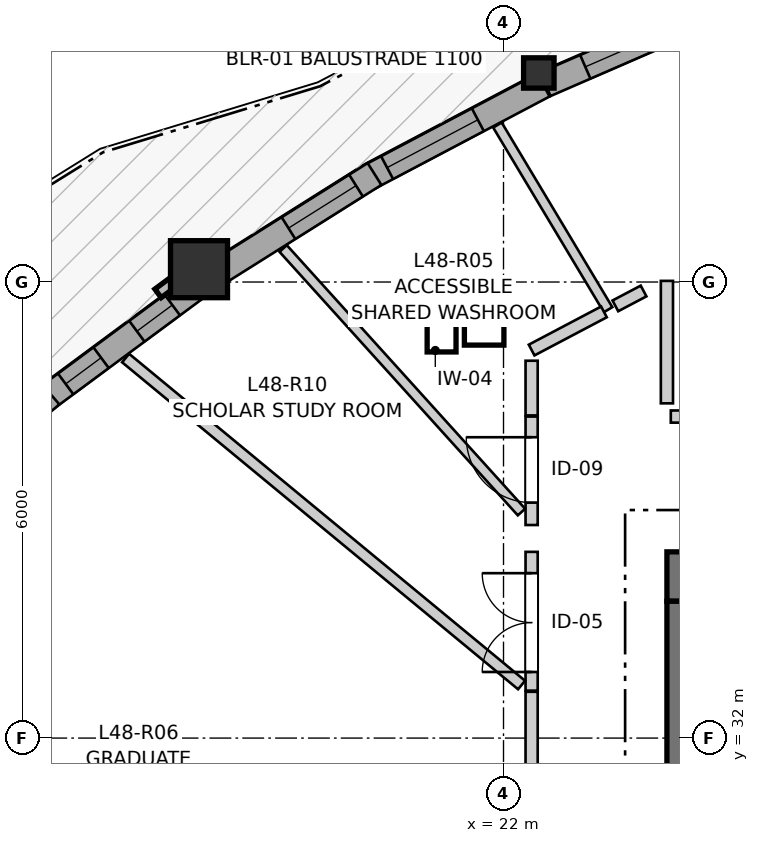
"""IFC4 building model, lengths in metres.
Left out: names, types, materials, properties, quantities, classifications, styles, units other than length and angle.
Written with IfcOpenShell. Run it as: python <this file> out.ifc"""

import sys

from ifc_helpers import new_model, si_unit, direction, frame, frame_2d, origin, origin_2d, place, context, subcontext, project, spatial, rectangle, i_section, extrude, source, transform, mapped, element, fill, save


model = new_model("IFC4")
c1 = context("Model", 3, precision=1e-05, world=origin(), true_north=direction((0.0, 1.0)))
c2 = subcontext(c1, "Body", "Model", "MODEL_VIEW")
j1 = project(units=[si_unit("LENGTHUNIT", "METRE"), si_unit("PLANEANGLEUNIT", "RADIAN")], contexts=[c1])
p1 = place(None, origin())
s1 = spatial("IfcSite", under=j1, at=p1, CompositionType="ELEMENT")
p2 = place(p1, origin())
s2 = spatial("IfcBuilding", under=s1, at=p2, CompositionType="ELEMENT")
p3 = place(p2, frame((0.0, 0.0, 161.8)))
s3 = spatial("IfcBuildingStorey", under=s2, at=p3, CompositionType="ELEMENT", Elevation=161.8)
p4 = place(p3, frame((36.55, 34.125, 0.0), z_axis=(0.0, 0.0, 1.0), x_axis=(-1.0, 0.0, 0.0)))
e1 = element("IfcWall", 1, at=p4, inside=s3, PredefinedType="SHEAR", context=c2, shape_type="SweptSolid", body=[
    extrude(rectangle(XDim=12.4, YDim=0.65, at=frame_2d((6.2, 0.0))), origin(), (0.0, 0.0, 1.0), 2.95),
])
p5 = place(p3, frame((24.475, 33.8, 0.0), z_axis=(0.0, 0.0, 1.0), x_axis=(0.0, -1.0, 0.0)))
e2 = element("IfcWall", 2, at=p5, inside=s3, PredefinedType="SHEAR", context=c2, shape_type="SweptSolid", body=[
    extrude(rectangle(XDim=15.6, YDim=0.65, at=frame_2d((7.8, 0.0))), origin(), (0.0, 0.0, 1.0), 2.95),
])
p6 = place(p5, frame((7.05, 0.0, 0.0)))
e3 = element("IfcOpeningElement", 3, at=p6, cuts=e2, PredefinedType="OPENING", context=c2, shape_type="SweptSolid", body=[
    extrude(rectangle(XDim=1.5, YDim=2.15, at=frame_2d((0.75, 1.075))), frame((0.0, 0.335, 0.0), z_axis=(0.0, -1.0, 0.0), x_axis=(1.0, 0.0, 0.0)), (0.0, 0.0, 1.0), 0.67),
])
p7 = place(p5, frame((3.52, 0.0, 0.0)))
e4 = element("IfcOpeningElement", 4, at=p7, cuts=e2, PredefinedType="OPENING", context=c2, shape_type="SweptSolid", body=[
    extrude(rectangle(XDim=0.86, YDim=2.05, at=frame_2d((0.43, 1.025))), frame((0.0, 0.335, 0.0), z_axis=(0.0, -1.0, 0.0), x_axis=(1.0, 0.0, 0.0)), (0.0, 0.0, 1.0), 0.67),
])
p8 = place(p5, frame((11.22, 0.0, 0.0)))
e5 = element("IfcOpeningElement", 5, at=p8, cuts=e2, PredefinedType="OPENING", context=c2, shape_type="SweptSolid", body=[
    extrude(rectangle(XDim=0.86, YDim=2.05, at=frame_2d((0.43, 1.025))), frame((0.0, 0.335, 0.0), z_axis=(0.0, -1.0, 0.0), x_axis=(1.0, 0.0, 0.0)), (0.0, 0.0, 1.0), 0.67),
])
m1 = source(origin(), c2, "Body", "SweptSolid", [
    extrude(i_section(OverallWidth=0.401, OverallDepth=0.399, WebThickness=0.023, FlangeThickness=0.036, FilletRadius=0.015, at=origin_2d()), origin(), (0.0, 0.0, 1.0), 2.95),
])
p9 = place(p3, frame((22.465, 40.75, 0.0), z_axis=(0.0, 0.0, 1.0), x_axis=(1.0, 0.0, 0.0)))
e6 = element("IfcColumn", 6, at=p9, inside=s3, PredefinedType="PILASTER", context=c2, shape_type="MappedRepresentation", body=[
    mapped(m1, transform((0.0, 0.0, 0.0), x_axis=(1.0, 0.0, 0.0), y_axis=(0.0, 1.0, 0.0), z_axis=(0.0, 0.0, 1.0), scale=1.0)),
])
m2 = source(origin(), c2, "Body", "SweptSolid", [
    extrude(rectangle(XDim=0.75, YDim=0.75, at=origin_2d()), origin(), (0.0, 0.0, 1.0), 2.95),
])
p10 = place(p3, frame((17.994, 38.169, 0.0), z_axis=(0.0, 0.0, 1.0), x_axis=(1.0, 0.0, 0.0)))
e7 = element("IfcColumn", 7, at=p10, inside=s3, PredefinedType="COLUMN", context=c2, shape_type="MappedRepresentation", body=[
    mapped(m2, transform((0.0, 0.0, 0.0), x_axis=(1.0, 0.0, 0.0), y_axis=(0.0, 1.0, 0.0), z_axis=(0.0, 0.0, 1.0), scale=1.0)),
])
p11 = place(p3, frame((24.95, 41.645, 0.0), z_axis=(0.0, 0.0, 1.0), x_axis=(-0.917090826553, -0.398678336322, 0.0)))
e8 = element("IfcWall", 8, at=p11, inside=s3, PredefinedType="SOLIDWALL", context=c2, shape_type="SweptSolid", body=[
    extrude(rectangle(XDim=2.616, YDim=0.34, at=frame_2d((1.308, 0.0))), origin(), (0.0, 0.0, 1.0), 2.53),
])
p12 = place(p11, frame((0.593, 0.0, 0.82)))
e9 = element("IfcOpeningElement", 9, at=p12, cuts=e8, PredefinedType="OPENING", context=c2, shape_type="SweptSolid", body=[
    extrude(rectangle(XDim=1.45, YDim=1.25, at=frame_2d((0.725, 0.625))), frame((0.0, 0.18, 0.0), z_axis=(0.0, -1.0, 0.0), x_axis=(1.0, 0.0, 0.0)), (0.0, 0.0, 1.0), 0.36),
])
p13 = place(p3, frame((22.526, 40.591, 0.0), z_axis=(0.0, 0.0, 1.0), x_axis=(-0.884394438343, -0.46674026763, 0.0)))
e10 = element("IfcWall", 10, at=p13, inside=s3, PredefinedType="SOLIDWALL", context=c2, shape_type="SweptSolid", body=[
    extrude(rectangle(XDim=2.601, YDim=0.34, at=frame_2d((1.301, 0.0))), origin(), (0.0, 0.0, 1.0), 2.53),
])
p14 = place(p13, frame((0.977, 0.0, 0.82)))
e11 = element("IfcOpeningElement", 11, at=p14, cuts=e10, PredefinedType="OPENING", context=c2, shape_type="SweptSolid", body=[
    extrude(rectangle(XDim=1.35, YDim=1.45, at=frame_2d((0.675, 0.725))), frame((0.0, 0.18, 0.0), z_axis=(0.0, -1.0, 0.0), x_axis=(1.0, 0.0, 0.0)), (0.0, 0.0, 1.0), 0.36),
])
p15 = place(p3, frame((20.303, 39.421, 0.0), z_axis=(0.0, 0.0, 1.0), x_axis=(-0.846381586821, -0.532576951707, 0.0)))
e12 = element("IfcWall", 12, at=p15, inside=s3, PredefinedType="SOLIDWALL", context=c2, shape_type="SweptSolid", body=[
    extrude(rectangle(XDim=2.466, YDim=0.34, at=frame_2d((1.233, 0.0))), origin(), (0.0, 0.0, 1.0), 2.53),
])
p16 = place(p15, frame((0.287, 0.0, 0.82)))
e13 = element("IfcOpeningElement", 13, at=p16, cuts=e12, PredefinedType="OPENING", context=c2, shape_type="SweptSolid", body=[
    extrude(rectangle(XDim=1.05, YDim=1.45, at=frame_2d((0.525, 0.725))), frame((0.0, 0.18, 0.0), z_axis=(0.0, -1.0, 0.0), x_axis=(1.0, 0.0, 0.0)), (0.0, 0.0, 1.0), 0.36),
])
p17 = place(p3, frame((17.97, 37.94, 0.0), z_axis=(0.0, 0.0, 1.0), x_axis=(-0.803844722302, -0.594839190393, 0.0)))
e14 = element("IfcWall", 14, at=p17, inside=s3, PredefinedType="SOLIDWALL", context=c2, shape_type="SweptSolid", body=[
    extrude(rectangle(XDim=2.481, YDim=0.34, at=frame_2d((1.24, 0.0))), origin(), (0.0, 0.0, 1.0), 2.53),
])
p18 = place(p17, frame((0.407, 0.0, 0.82)))
e15 = element("IfcOpeningElement", 15, at=p18, cuts=e14, PredefinedType="OPENING", context=c2, shape_type="SweptSolid", body=[
    extrude(rectangle(XDim=0.58, YDim=1.35, at=frame_2d((0.29, 0.675))), frame((0.0, 0.18, 0.0), z_axis=(0.0, -1.0, 0.0), x_axis=(1.0, 0.0, 0.0)), (0.0, 0.0, 1.0), 0.36),
])
p19 = place(p17, frame((1.573, 0.0, 0.82)))
e16 = element("IfcOpeningElement", 16, at=p19, cuts=e14, PredefinedType="OPENING", context=c2, shape_type="SweptSolid", body=[
    extrude(rectangle(XDim=0.58, YDim=1.35, at=frame_2d((0.29, 0.675))), frame((0.0, 0.18, 0.0), z_axis=(0.0, -1.0, 0.0), x_axis=(1.0, 0.0, 0.0)), (0.0, 0.0, 1.0), 0.36),
])
p20 = place(p3, frame((16.045, 36.519, 0.0), z_axis=(0.0, 0.0, 1.0), x_axis=(-0.757449302754, -0.652893983551, 0.0)))
e17 = element("IfcWall", 17, at=p20, inside=s3, PredefinedType="SOLIDWALL", context=c2, shape_type="SweptSolid", body=[
    extrude(rectangle(XDim=2.646, YDim=0.34, at=frame_2d((1.323, 0.0))), origin(), (0.0, 0.0, 1.0), 2.53),
])
p21 = place(p20, frame((0.708, 0.0, 0.82)))
e18 = element("IfcOpeningElement", 18, at=p21, cuts=e17, PredefinedType="OPENING", context=c2, shape_type="SweptSolid", body=[
    extrude(rectangle(XDim=1.25, YDim=1.35, at=frame_2d((0.625, 0.675))), frame((0.0, 0.18, 0.0), z_axis=(0.0, -1.0, 0.0), x_axis=(1.0, 0.0, 0.0)), (0.0, 0.0, 1.0), 0.36),
])
p22 = place(p3, frame((24.201, 36.23, 0.0), z_axis=(0.0, 0.0, 1.0), x_axis=(1.0, 0.0, 0.0)))
e19 = element("IfcWall", 19, at=p22, inside=s3, PredefinedType="PARTITIONING", context=c2, shape_type="SweptSolid", body=[
    extrude(rectangle(XDim=7.868, YDim=0.16, at=frame_2d((3.934, 0.0))), origin(), (0.0, 0.0, 1.0), 2.95),
])
p23 = place(p22, frame((3.456, 0.0, 0.0)))
e20 = element("IfcOpeningElement", 20, at=p23, cuts=e19, PredefinedType="OPENING", context=c2, shape_type="SweptSolid", body=[
    extrude(rectangle(XDim=0.96, YDim=2.1, at=frame_2d((0.48, 1.05))), frame((0.0, 0.09, 0.0), z_axis=(0.0, -1.0, 0.0), x_axis=(1.0, 0.0, 0.0)), (0.0, 0.0, 1.0), 0.18),
])
p24 = place(p3, frame((22.37, 27.85, 0.0), z_axis=(0.0, 0.0, 1.0), x_axis=(0.0, 1.0, 0.0)))
e21 = element("IfcWall", 21, at=p24, inside=s3, PredefinedType="PARTITIONING", context=c2, shape_type="SweptSolid", body=[
    extrude(rectangle(XDim=4.759, YDim=0.16, at=frame_2d((2.379, 0.0))), origin(), (0.0, 0.0, 1.0), 2.95),
])
p25 = place(p24, frame((1.919, 0.0, 0.0)))
e22 = element("IfcOpeningElement", 22, at=p25, cuts=e21, PredefinedType="OPENING", context=c2, shape_type="SweptSolid", body=[
    extrude(rectangle(XDim=0.96, YDim=2.1, at=frame_2d((0.48, 1.05))), frame((0.0, 0.09, 0.0), z_axis=(0.0, -1.0, 0.0), x_axis=(1.0, 0.0, 0.0)), (0.0, 0.0, 1.0), 0.18),
])
p26 = place(p3, frame((22.37, 32.624, 0.0), z_axis=(0.0, 0.0, 1.0), x_axis=(0.0, 1.0, 0.0)))
e23 = element("IfcWall", 23, at=p26, inside=s3, PredefinedType="PARTITIONING", context=c2, shape_type="SweptSolid", body=[
    extrude(rectangle(XDim=1.826, YDim=0.16, at=frame_2d((0.913, 0.0))), origin(), (0.0, 0.0, 1.0), 2.95),
])
p27 = place(p26, frame((0.246, 0.0, 0.0)))
e24 = element("IfcOpeningElement", 24, at=p27, cuts=e23, PredefinedType="OPENING", context=c2, shape_type="SweptSolid", body=[
    extrude(rectangle(XDim=1.3, YDim=2.1, at=frame_2d((0.65, 1.05))), frame((0.0, 0.09, 0.0), z_axis=(0.0, -1.0, 0.0), x_axis=(1.0, 0.0, 0.0)), (0.0, 0.0, 1.0), 0.18),
])
p28 = place(p3, frame((22.37, 34.803, 0.0), z_axis=(0.0, 0.0, 1.0), x_axis=(0.0, 1.0, 0.0)))
e25 = element("IfcWall", 25, at=p28, inside=s3, PredefinedType="PARTITIONING", context=c2, shape_type="SweptSolid", body=[
    extrude(rectangle(XDim=1.427, YDim=0.16, at=frame_2d((0.713, 0.0))), origin(), (0.0, 0.0, 1.0), 2.95),
])
p29 = place(p28, frame((0.295, 0.0, 0.0)))
e26 = element("IfcOpeningElement", 26, at=p29, cuts=e25, PredefinedType="OPENING", context=c2, shape_type="SweptSolid", body=[
    extrude(rectangle(XDim=0.86, YDim=2.05, at=frame_2d((0.43, 1.025))), frame((0.0, 0.09, 0.0), z_axis=(0.0, -1.0, 0.0), x_axis=(1.0, 0.0, 0.0)), (0.0, 0.0, 1.0), 0.18),
])
p30 = place(p3, frame((17.028, 37.0, 0.0), z_axis=(0.0, 0.0, 1.0), x_axis=(0.771119105053, -0.636690918596, 0.0)))
e27 = element("IfcWall", 27, at=p30, inside=s3, PredefinedType="PARTITIONING", context=c2, shape_type="SweptSolid", body=[
    extrude(rectangle(XDim=6.756, YDim=0.145, at=frame_2d((3.378, 0.0))), origin(), (0.0, 0.0, 1.0), 2.95),
])
p31 = place(p3, frame((19.101, 38.441, 0.0), z_axis=(0.0, 0.0, 1.0), x_axis=(0.670702711046, -0.741726279295, 0.0)))
e28 = element("IfcWall", 28, at=p31, inside=s3, PredefinedType="PARTITIONING", context=c2, shape_type="SweptSolid", body=[
    extrude(rectangle(XDim=4.675, YDim=0.13, at=frame_2d((2.337, 0.0))), origin(), (0.0, 0.0, 1.0), 2.95),
])
p32 = place(p3, frame((21.92, 40.065, 0.0), z_axis=(0.0, 0.0, 1.0), x_axis=(0.514051974364, -0.857759038223, 0.0)))
e29 = element("IfcWall", 29, at=p32, inside=s3, PredefinedType="PARTITIONING", context=c2, shape_type="SweptSolid", body=[
    extrude(rectangle(XDim=2.832, YDim=0.13, at=frame_2d((1.416, 0.0))), origin(), (0.0, 0.0, 1.0), 2.95),
])
p33 = place(p3, frame((24.15, 36.404, 0.0), z_axis=(0.0, 0.0, 1.0), x_axis=(0.0, 1.0, 0.0)))
e30 = element("IfcWall", 30, at=p33, inside=s3, PredefinedType="PARTITIONING", context=c2, shape_type="SweptSolid", body=[
    extrude(rectangle(XDim=1.611, YDim=0.16, at=frame_2d((0.805, 0.0))), origin(), (0.0, 0.0, 1.0), 2.95),
])
p34 = place(p3, frame((22.37, 37.105, 0.0), z_axis=(0.0, 0.0, 1.0), x_axis=(0.884455008011, 0.466625480234, 0.0)))
e31 = element("IfcWall", 31, at=p34, inside=s3, PredefinedType="PARTITIONING", context=c2, shape_type="SweptSolid", body=[
    extrude(rectangle(XDim=1.076, YDim=0.16, at=frame_2d((0.538, 0.0))), origin(), (0.0, 0.0, 1.0), 2.558),
])
p35 = place(p3, frame((22.37, 36.245, 0.0), z_axis=(0.0, 0.0, 1.0), x_axis=(0.0, 1.0, 0.0)))
e32 = element("IfcWall", 32, at=p35, inside=s3, PredefinedType="PARTITIONING", context=c2, shape_type="SweptSolid", body=[
    extrude(rectangle(XDim=0.719, YDim=0.16, at=frame_2d((0.36, 0.0))), origin(), (0.0, 0.0, 1.0), 2.95),
])
p36 = place(p3, frame((23.472, 37.686, 0.0), z_axis=(0.0, 0.0, 1.0), x_axis=(0.884564737935, 0.466417435782, 0.0)))
e33 = element("IfcWall", 33, at=p36, inside=s3, PredefinedType="PARTITIONING", context=c2, shape_type="SweptSolid", body=[
    extrude(rectangle(XDim=0.42, YDim=0.16, at=frame_2d((0.21, 0.0))), origin(), (0.0, 0.0, 1.0), 2.558),
])
m3 = source(origin(), c2, "Body", "SweptSolid", [
    extrude(rectangle(XDim=1.45, YDim=1.25, at=frame_2d((0.725, 0.625))), frame((0.0, 0.03, 0.0), z_axis=(0.0, -1.0, 0.0), x_axis=(1.0, 0.0, 0.0)), (0.0, 0.0, 1.0), 0.06),
])
p37 = place(p12, origin())
e34 = element("IfcWindow", 34, at=p37, inside=s3, PartitioningType="SINGLE_PANEL", PredefinedType="WINDOW", context=c2, shape_type="MappedRepresentation", body=[
    mapped(m3, transform((0.0, 0.0, 0.0), x_axis=(1.0, 0.0, 0.0), y_axis=(0.0, 1.0, 0.0), z_axis=(0.0, 0.0, 1.0), scale=1.0)),
])
fill(e9, e34)
m4 = source(origin(), c2, "Body", "SweptSolid", [
    extrude(rectangle(XDim=1.35, YDim=1.45, at=frame_2d((0.675, 0.725))), frame((0.0, 0.03, 0.0), z_axis=(0.0, -1.0, 0.0), x_axis=(1.0, 0.0, 0.0)), (0.0, 0.0, 1.0), 0.06),
])
p38 = place(p14, origin())
e35 = element("IfcWindow", 35, at=p38, inside=s3, PartitioningType="SINGLE_PANEL", PredefinedType="WINDOW", context=c2, shape_type="MappedRepresentation", body=[
    mapped(m4, transform((0.0, 0.0, 0.0), x_axis=(1.0, 0.0, 0.0), y_axis=(0.0, 1.0, 0.0), z_axis=(0.0, 0.0, 1.0), scale=1.0)),
])
fill(e11, e35)
m5 = source(origin(), c2, "Body", "SweptSolid", [
    extrude(rectangle(XDim=1.05, YDim=1.45, at=frame_2d((0.525, 0.725))), frame((0.0, 0.03, 0.0), z_axis=(0.0, -1.0, 0.0), x_axis=(1.0, 0.0, 0.0)), (0.0, 0.0, 1.0), 0.06),
])
p39 = place(p16, origin())
e36 = element("IfcWindow", 36, at=p39, inside=s3, PartitioningType="SINGLE_PANEL", PredefinedType="WINDOW", context=c2, shape_type="MappedRepresentation", body=[
    mapped(m5, transform((0.0, 0.0, 0.0), x_axis=(1.0, 0.0, 0.0), y_axis=(0.0, 1.0, 0.0), z_axis=(0.0, 0.0, 1.0), scale=1.0)),
])
fill(e13, e36)
m6 = source(origin(), c2, "Body", "SweptSolid", [
    extrude(rectangle(XDim=0.58, YDim=1.35, at=frame_2d((0.29, 0.675))), frame((0.0, 0.03, 0.0), z_axis=(0.0, -1.0, 0.0), x_axis=(1.0, 0.0, 0.0)), (0.0, 0.0, 1.0), 0.06),
])
p40 = place(p18, origin())
e37 = element("IfcWindow", 37, at=p40, inside=s3, PartitioningType="SINGLE_PANEL", PredefinedType="WINDOW", context=c2, shape_type="MappedRepresentation", body=[
    mapped(m6, transform((0.0, 0.0, 0.0), x_axis=(1.0, 0.0, 0.0), y_axis=(0.0, 1.0, 0.0), z_axis=(0.0, 0.0, 1.0), scale=1.0)),
])
fill(e15, e37)
p41 = place(p19, origin())
e38 = element("IfcWindow", 38, at=p41, inside=s3, PartitioningType="SINGLE_PANEL", PredefinedType="WINDOW", context=c2, shape_type="MappedRepresentation", body=[
    mapped(m6, transform((0.0, 0.0, 0.0), x_axis=(1.0, 0.0, 0.0), y_axis=(0.0, 1.0, 0.0), z_axis=(0.0, 0.0, 1.0), scale=1.0)),
])
fill(e16, e38)
m7 = source(origin(), c2, "Body", "SweptSolid", [
    extrude(rectangle(XDim=1.3, YDim=2.1, at=frame_2d((0.65, 1.05))), frame((0.0, 0.025, 0.0), z_axis=(0.0, -1.0, 0.0), x_axis=(1.0, 0.0, 0.0)), (0.0, 0.0, 1.0), 0.05),
])
p42 = place(p27, origin())
e39 = element("IfcDoor", 39, at=p42, inside=s3, OperationType="DOUBLE_DOOR_SINGLE_SWING", PredefinedType="DOOR", context=c2, shape_type="MappedRepresentation", body=[
    mapped(m7, transform((0.0, 0.0, 0.0), x_axis=(1.0, 0.0, 0.0), y_axis=(0.0, 1.0, 0.0), z_axis=(0.0, 0.0, 1.0), scale=1.0)),
])
fill(e24, e39)
m8 = source(origin(), c2, "Body", "SweptSolid", [
    extrude(rectangle(XDim=0.86, YDim=2.05, at=frame_2d((0.43, 1.025))), frame((0.0, 0.025, 0.0), z_axis=(0.0, -1.0, 0.0), x_axis=(1.0, 0.0, 0.0)), (0.0, 0.0, 1.0), 0.05),
])
p43 = place(p29, origin())
e40 = element("IfcDoor", 40, at=p43, inside=s3, OperationType="SINGLE_SWING_RIGHT", PredefinedType="DOOR", context=c2, shape_type="MappedRepresentation", body=[
    mapped(m8, transform((0.0, 0.0, 0.0), x_axis=(1.0, 0.0, 0.0), y_axis=(0.0, 1.0, 0.0), z_axis=(0.0, 0.0, 1.0), scale=1.0)),
])
fill(e26, e40)
save(model, sys.argv[1])
